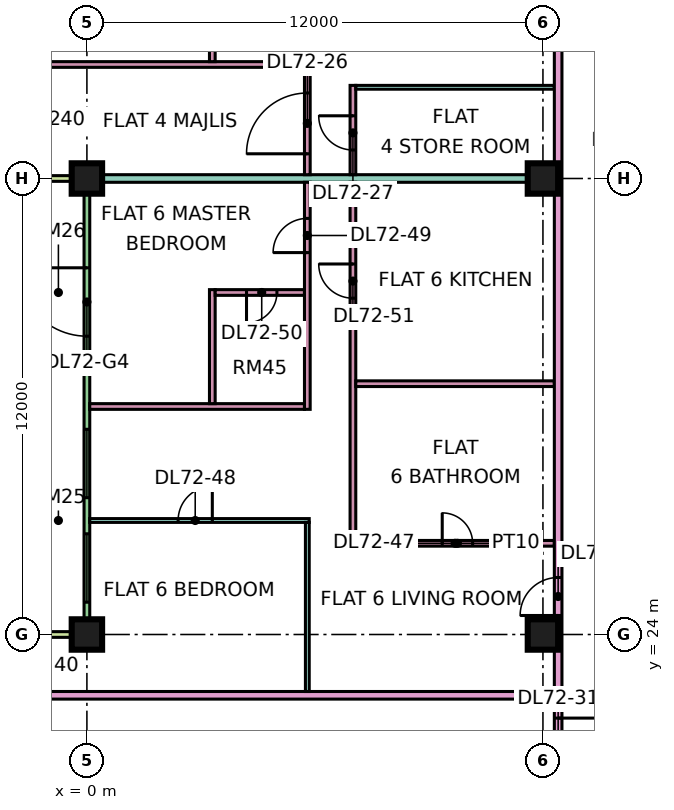
"""IFC4 building model, lengths in metres.
Left out: names, types, materials, properties, quantities, classifications, styles, units other than length and angle.
Written with IfcOpenShell. Run it as: python <this file> out.ifc"""

import sys

from ifc_helpers import new_model, si_unit, direction, frame, frame_2d, origin, origin_2d, place, context, subcontext, project, spatial, rectangle, extrude, element, fill, save


model = new_model("IFC4")
c1 = context("Model", 3, precision=1e-05, world=origin(), true_north=direction((0.0, 1.0)))
c2 = subcontext(c1, "Body", "Model", "MODEL_VIEW")
j1 = project(units=[si_unit("LENGTHUNIT", "METRE"), si_unit("PLANEANGLEUNIT", "RADIAN")], contexts=[c1])
p1 = place(None, origin())
s1 = spatial("IfcSite", under=j1, at=p1, CompositionType="ELEMENT")
p2 = place(p1, origin())
s2 = spatial("IfcBuilding", under=s1, at=p2, CompositionType="ELEMENT")
p3 = place(p2, frame((0.0, 0.0, 307.15)))
s3 = spatial("IfcBuildingStorey", under=s2, at=p3, CompositionType="ELEMENT", Elevation=307.15)
p4 = place(p3, frame((0.0, 24.0, 0.0), z_axis=(0.0, 0.0, 1.0), x_axis=(1.0, 0.0, 0.0)))
e1 = element("IfcColumn", 1, at=p4, inside=s3, PredefinedType="COLUMN", context=c2, shape_type="SweptSolid", body=[
    extrude(rectangle(XDim=0.8, YDim=0.8, at=origin_2d()), origin(), (0.0, 0.0, 1.0), 3.75),
])
p5 = place(p3, frame((0.0, 36.0, 0.0), z_axis=(0.0, 0.0, 1.0), x_axis=(1.0, 0.0, 0.0)))
e2 = element("IfcColumn", 2, at=p5, inside=s3, PredefinedType="COLUMN", context=c2, shape_type="SweptSolid", body=[
    extrude(rectangle(XDim=0.8, YDim=0.8, at=origin_2d()), origin(), (0.0, 0.0, 1.0), 3.75),
])
for number, where, z_axis, x_axis in (
    (3, (12.0, 24.0, 0.0), (0.0, 0.0, 1.0), (1.0, 0.0, 0.0)),
    (4, (12.0, 36.0, 0.0), (0.0, 0.0, 1.0), (1.0, 0.0, 0.0)),
):
    element("IfcColumn", number, at=place(p3, frame(where, z_axis=z_axis, x_axis=x_axis)), inside=s3, PredefinedType="COLUMN", context=c2, shape_type="SweptSolid", body=[
        extrude(rectangle(XDim=0.8, YDim=0.8, at=origin_2d()), origin(), (0.0, 0.0, 1.0), 3.75),
    ])
p6 = place(p3, frame((0.0, 35.925, 0.0), z_axis=(0.0, 0.0, 1.0), x_axis=(0.0, -1.0, 0.0)))
e5 = element("IfcWall", 5, at=p6, inside=s3, PredefinedType="SOLIDWALL", context=c2, shape_type="SweptSolid", body=[
    extrude(rectangle(XDim=11.85, YDim=0.15, at=frame_2d((5.925, 0.0))), origin(), (0.0, 0.0, 1.0), 3.35),
])
p7 = place(p6, frame((2.275, 0.0, 0.0)))
e6 = element("IfcOpeningElement", 6, at=p7, cuts=e5, PredefinedType="OPENING", context=c2, shape_type="SweptSolid", body=[
    extrude(rectangle(XDim=1.8, YDim=2.4, at=frame_2d((0.9, 1.2))), frame((0.0, 0.085, 0.0), z_axis=(0.0, -1.0, 0.0), x_axis=(1.0, 0.0, 0.0)), (0.0, 0.0, 1.0), 0.17),
])
p8 = place(p6, frame((6.525, 0.0, 0.45)))
e7 = element("IfcOpeningElement", 7, at=p8, cuts=e5, PredefinedType="OPENING", context=c2, shape_type="SweptSolid", body=[
    extrude(rectangle(XDim=1.8, YDim=2.4, at=frame_2d((0.9, 1.2))), frame((0.0, 0.085, 0.0), z_axis=(0.0, -1.0, 0.0), x_axis=(1.0, 0.0, 0.0)), (0.0, 0.0, 1.0), 0.17),
])
p9 = place(p6, frame((9.275, 0.0, 0.45)))
e8 = element("IfcOpeningElement", 8, at=p9, cuts=e5, PredefinedType="OPENING", context=c2, shape_type="SweptSolid", body=[
    extrude(rectangle(XDim=1.8, YDim=2.4, at=frame_2d((0.9, 1.2))), frame((0.0, 0.085, 0.0), z_axis=(0.0, -1.0, 0.0), x_axis=(1.0, 0.0, 0.0)), (0.0, 0.0, 1.0), 0.17),
])
for number, where, z_axis, x_axis in (
    (9, (-1.5, 36.0, 0.0), (0.0, 0.0, 1.0), (1.0, 0.0, 0.0)),
    (10, (-1.5, 24.0, 0.0), (0.0, 0.0, 1.0), (1.0, 0.0, 0.0)),
):
    element("IfcWall", number, at=place(p3, frame(where, z_axis=z_axis, x_axis=x_axis)), inside=s3, PredefinedType="SOLIDWALL", context=c2, shape_type="SweptSolid", body=[
        extrude(rectangle(XDim=1.5, YDim=0.15, at=frame_2d((0.75, 0.0))), origin(), (0.0, 0.0, 1.0), 3.35),
    ])
p10 = place(p3, frame((-1.351, 39.0, 0.0), z_axis=(0.0, 0.0, 1.0), x_axis=(1.0, 0.0, 0.0)))
e11 = element("IfcWall", 11, at=p10, inside=s3, PredefinedType="PARTITIONING", context=c2, shape_type="SweptSolid", body=[
    extrude(rectangle(XDim=7.076, YDim=0.15, at=frame_2d((3.538, 0.0))), origin(), (0.0, 0.0, 1.0), 3.35),
])
p11 = place(p3, frame((-1.35, 22.4, 0.0), z_axis=(0.0, 0.0, 1.0), x_axis=(1.0, 0.0, 0.0)))
e12 = element("IfcWall", 12, at=p11, inside=s3, PredefinedType="PARTITIONING", context=c2, shape_type="SweptSolid", body=[
    extrude(rectangle(XDim=13.65, YDim=0.2, at=frame_2d((6.825, 0.0))), origin(), (0.0, 0.0, 1.0), 3.35),
])
e13 = element("IfcWall", 13, at=p5, inside=s3, PredefinedType="PARTITIONING", context=c2, shape_type="SweptSolid", body=[
    extrude(rectangle(XDim=12.3, YDim=0.2, at=frame_2d((6.15, 0.0))), origin(), (0.0, 0.0, 1.0), 3.35),
])
p12 = place(p3, frame((0.074, 27.0, 0.0), z_axis=(0.0, 0.0, 1.0), x_axis=(1.0, 0.0, 0.0)))
e14 = element("IfcWall", 14, at=p12, inside=s3, PredefinedType="PARTITIONING", context=c2, shape_type="SweptSolid", body=[
    extrude(rectangle(XDim=5.776, YDim=0.1, at=frame_2d((2.888, 0.0))), origin(), (0.0, 0.0, 1.0), 3.35),
])
p13 = place(p12, frame((2.326, 0.0, 0.0)))
e15 = element("IfcOpeningElement", 15, at=p13, cuts=e14, PredefinedType="OPENING", context=c2, shape_type="SweptSolid", body=[
    extrude(rectangle(XDim=0.9, YDim=2.1, at=frame_2d((0.45, 1.05))), frame((0.0, 0.06, 0.0), z_axis=(0.0, -1.0, 0.0), x_axis=(1.0, 0.0, 0.0)), (0.0, 0.0, 1.0), 0.12),
])
p14 = place(p3, frame((0.074, 30.0, 0.0), z_axis=(0.0, 0.0, 1.0), x_axis=(1.0, 0.0, 0.0)))
e16 = element("IfcWall", 16, at=p14, inside=s3, PredefinedType="PARTITIONING", context=c2, shape_type="SweptSolid", body=[
    extrude(rectangle(XDim=5.651, YDim=0.15, at=frame_2d((2.826, 0.0))), origin(), (0.0, 0.0, 1.0), 3.35),
])
for number, where, z_axis, x_axis in (
    (17, (3.3, 30.075, 0.0), (0.0, 0.0, 1.0), (0.0, 1.0, 0.0)),
    (18, (3.3, 39.075, 0.0), (0.0, 0.0, 1.0), (0.0, 1.0, 0.0)),
):
    element("IfcWall", number, at=place(p3, frame(where, z_axis=z_axis, x_axis=x_axis)), inside=s3, PredefinedType="PARTITIONING", context=c2, shape_type="SweptSolid", body=[
        extrude(rectangle(XDim=3.0, YDim=0.15, at=frame_2d((1.5, 0.0))), origin(), (0.0, 0.0, 1.0), 3.35),
    ])
p15 = place(p3, frame((3.375, 33.0, 0.0), z_axis=(0.0, 0.0, 1.0), x_axis=(1.0, 0.0, 0.0)))
e19 = element("IfcWall", 19, at=p15, inside=s3, PredefinedType="PARTITIONING", context=c2, shape_type="SweptSolid", body=[
    extrude(rectangle(XDim=2.35, YDim=0.15, at=frame_2d((1.175, 0.0))), origin(), (0.0, 0.0, 1.0), 3.35),
])
p16 = place(p15, frame((0.825, 0.0, 0.0)))
e20 = element("IfcOpeningElement", 20, at=p16, cuts=e19, PredefinedType="OPENING", context=c2, shape_type="SweptSolid", body=[
    extrude(rectangle(XDim=0.8, YDim=2.1, at=frame_2d((0.4, 1.05))), frame((0.0, 0.085, 0.0), z_axis=(0.0, -1.0, 0.0), x_axis=(1.0, 0.0, 0.0)), (0.0, 0.0, 1.0), 0.17),
])
p17 = place(p3, frame((5.8, 22.5, 0.0), z_axis=(0.0, 0.0, 1.0), x_axis=(0.0, 1.0, 0.0)))
e21 = element("IfcWall", 21, at=p17, inside=s3, PredefinedType="PARTITIONING", context=c2, shape_type="SweptSolid", body=[
    extrude(rectangle(XDim=4.45, YDim=0.1, at=frame_2d((2.225, 0.0))), origin(), (0.0, 0.0, 1.0), 3.35),
])
p18 = place(p3, frame((5.8, 29.925, 0.0), z_axis=(0.0, 0.0, 1.0), x_axis=(0.0, 1.0, 0.0)))
e22 = element("IfcWall", 22, at=p18, inside=s3, PredefinedType="PARTITIONING", context=c2, shape_type="SweptSolid", body=[
    extrude(rectangle(XDim=5.975, YDim=0.15, at=frame_2d((2.987, 0.0))), origin(), (0.0, 0.0, 1.0), 3.35),
])
p19 = place(p18, frame((4.125, 0.0, 0.0)))
e23 = element("IfcOpeningElement", 23, at=p19, cuts=e22, PredefinedType="OPENING", context=c2, shape_type="SweptSolid", body=[
    extrude(rectangle(XDim=0.9, YDim=2.1, at=frame_2d((0.45, 1.05))), frame((0.0, 0.085, 0.0), z_axis=(0.0, -1.0, 0.0), x_axis=(1.0, 0.0, 0.0)), (0.0, 0.0, 1.0), 0.17),
])
p20 = place(p3, frame((5.8, 36.1, 0.0), z_axis=(0.0, 0.0, 1.0), x_axis=(0.0, 1.0, 0.0)))
e24 = element("IfcWall", 24, at=p20, inside=s3, PredefinedType="PARTITIONING", context=c2, shape_type="SweptSolid", body=[
    extrude(rectangle(XDim=11.95, YDim=0.15, at=frame_2d((5.975, 0.0))), origin(), (0.0, 0.0, 1.0), 3.35),
])
p21 = place(p20, frame((9.95, 0.0, 0.0)))
e25 = element("IfcOpeningElement", 25, at=p21, cuts=e24, PredefinedType="OPENING", context=c2, shape_type="SweptSolid", body=[
    extrude(rectangle(XDim=0.9, YDim=2.1, at=frame_2d((0.45, 1.05))), frame((0.0, 0.085, 0.0), z_axis=(0.0, -1.0, 0.0), x_axis=(1.0, 0.0, 0.0)), (0.0, 0.0, 1.0), 0.17),
])
p22 = place(p20, frame((6.95, 0.0, 0.0)))
e26 = element("IfcOpeningElement", 26, at=p22, cuts=e24, PredefinedType="OPENING", context=c2, shape_type="SweptSolid", body=[
    extrude(rectangle(XDim=0.9, YDim=2.1, at=frame_2d((0.45, 1.05))), frame((0.0, 0.085, 0.0), z_axis=(0.0, -1.0, 0.0), x_axis=(1.0, 0.0, 0.0)), (0.0, 0.0, 1.0), 0.17),
])
p23 = place(p20, frame((0.55, 0.0, 0.0)))
e27 = element("IfcOpeningElement", 27, at=p23, cuts=e24, PredefinedType="OPENING", context=c2, shape_type="SweptSolid", body=[
    extrude(rectangle(XDim=1.6, YDim=2.1, at=frame_2d((0.8, 1.05))), frame((0.0, 0.085, 0.0), z_axis=(0.0, -1.0, 0.0), x_axis=(1.0, 0.0, 0.0)), (0.0, 0.0, 1.0), 0.17),
])
p24 = place(p3, frame((7.0, 26.325, 0.0), z_axis=(0.0, 0.0, 1.0), x_axis=(0.0, 1.0, 0.0)))
e28 = element("IfcWall", 28, at=p24, inside=s3, PredefinedType="PARTITIONING", context=c2, shape_type="SweptSolid", body=[
    extrude(rectangle(XDim=9.575, YDim=0.15, at=frame_2d((4.788, 0.0))), origin(), (0.0, 0.0, 1.0), 3.35),
])
p25 = place(p24, frame((6.525, 0.0, 0.0)))
e29 = element("IfcOpeningElement", 29, at=p25, cuts=e28, PredefinedType="OPENING", context=c2, shape_type="SweptSolid", body=[
    extrude(rectangle(XDim=0.9, YDim=2.1, at=frame_2d((0.45, 1.05))), frame((0.0, 0.085, 0.0), z_axis=(0.0, -1.0, 0.0), x_axis=(1.0, 0.0, 0.0)), (0.0, 0.0, 1.0), 0.17),
])
p26 = place(p3, frame((7.0, 36.1, 0.0), z_axis=(0.0, 0.0, 1.0), x_axis=(0.0, 1.0, 0.0)))
e30 = element("IfcWall", 30, at=p26, inside=s3, PredefinedType="PARTITIONING", context=c2, shape_type="SweptSolid", body=[
    extrude(rectangle(XDim=2.35, YDim=0.15, at=frame_2d((1.175, 0.0))), origin(), (0.0, 0.0, 1.0), 3.35),
])
p27 = place(p26, frame((0.65, 0.0, 0.0)))
e31 = element("IfcOpeningElement", 31, at=p27, cuts=e30, PredefinedType="OPENING", context=c2, shape_type="SweptSolid", body=[
    extrude(rectangle(XDim=0.9, YDim=2.1, at=frame_2d((0.45, 1.05))), frame((0.0, 0.085, 0.0), z_axis=(0.0, -1.0, 0.0), x_axis=(1.0, 0.0, 0.0)), (0.0, 0.0, 1.0), 0.17),
])
p28 = place(p3, frame((7.075, 26.4, 0.0), z_axis=(0.0, 0.0, 1.0), x_axis=(1.0, 0.0, 0.0)))
e32 = element("IfcWall", 32, at=p28, inside=s3, PredefinedType="PARTITIONING", context=c2, shape_type="SweptSolid", body=[
    extrude(rectangle(XDim=5.225, YDim=0.15, at=frame_2d((2.613, 0.0))), origin(), (0.0, 0.0, 1.0), 3.35),
])
p29 = place(p28, frame((2.275, 0.0, 0.0)))
e33 = element("IfcOpeningElement", 33, at=p29, cuts=e32, PredefinedType="OPENING", context=c2, shape_type="SweptSolid", body=[
    extrude(rectangle(XDim=0.8, YDim=2.1, at=frame_2d((0.4, 1.05))), frame((0.0, 0.085, 0.0), z_axis=(0.0, -1.0, 0.0), x_axis=(1.0, 0.0, 0.0)), (0.0, 0.0, 1.0), 0.17),
])
p30 = place(p3, frame((7.075, 30.6, 0.0), z_axis=(0.0, 0.0, 1.0), x_axis=(1.0, 0.0, 0.0)))
e34 = element("IfcWall", 34, at=p30, inside=s3, PredefinedType="PARTITIONING", context=c2, shape_type="SweptSolid", body=[
    extrude(rectangle(XDim=5.225, YDim=0.15, at=frame_2d((2.613, 0.0))), origin(), (0.0, 0.0, 1.0), 3.35),
])
p31 = place(p3, frame((7.075, 38.4, 0.0), z_axis=(0.0, 0.0, 1.0), x_axis=(1.0, 0.0, 0.0)))
e35 = element("IfcWall", 35, at=p31, inside=s3, PredefinedType="PARTITIONING", context=c2, shape_type="SweptSolid", body=[
    extrude(rectangle(XDim=5.225, YDim=0.1, at=frame_2d((2.613, 0.0))), origin(), (0.0, 0.0, 1.0), 3.35),
])
p32 = place(p3, frame((12.4, 20.0, 0.0), z_axis=(0.0, 0.0, 1.0), x_axis=(0.0, 1.0, 0.0)))
e36 = element("IfcWall", 36, at=p32, inside=s3, PredefinedType="PARTITIONING", context=c2, shape_type="SweptSolid", body=[
    extrude(rectangle(XDim=34.0, YDim=0.2, at=frame_2d((17.0, 0.0))), origin(), (0.0, 0.0, 1.0), 3.35),
])
p33 = place(p32, frame((19.8, 0.0, 0.0)))
e37 = element("IfcOpeningElement", 37, at=p33, cuts=e36, PredefinedType="OPENING", context=c2, shape_type="SweptSolid", body=[
    extrude(rectangle(XDim=1.0, YDim=2.1, at=frame_2d((0.5, 1.05))), frame((0.0, 0.11, 0.0), z_axis=(0.0, -1.0, 0.0), x_axis=(1.0, 0.0, 0.0)), (0.0, 0.0, 1.0), 0.22),
])
p34 = place(p32, frame((0.6, 0.0, 0.0)))
e38 = element("IfcOpeningElement", 38, at=p34, cuts=e36, PredefinedType="OPENING", context=c2, shape_type="SweptSolid", body=[
    extrude(rectangle(XDim=1.2, YDim=2.1, at=frame_2d((0.6, 1.05))), frame((0.0, 0.11, 0.0), z_axis=(0.0, -1.0, 0.0), x_axis=(1.0, 0.0, 0.0)), (0.0, 0.0, 1.0), 0.22),
])
p35 = place(p32, frame((4.5, 0.0, 0.0)))
e39 = element("IfcOpeningElement", 39, at=p35, cuts=e36, PredefinedType="OPENING", context=c2, shape_type="SweptSolid", body=[
    extrude(rectangle(XDim=1.0, YDim=2.1, at=frame_2d((0.5, 1.05))), frame((0.0, 0.11, 0.0), z_axis=(0.0, -1.0, 0.0), x_axis=(1.0, 0.0, 0.0)), (0.0, 0.0, 1.0), 0.22),
])
p36 = place(p7, frame((1.8, 0.0, 0.0), z_axis=(0.0, 0.0, 1.0), x_axis=(-1.0, 0.0, 0.0)))
e40 = element("IfcDoor", 40, at=p36, inside=s3, OperationType="DOUBLE_DOOR_SINGLE_SWING", PredefinedType="DOOR", context=c2, shape_type="SweptSolid", body=[
    extrude(rectangle(XDim=1.8, YDim=2.4, at=frame_2d((0.9, 1.2))), frame((0.0, 0.025, 0.0), z_axis=(0.0, -1.0, 0.0), x_axis=(1.0, 0.0, 0.0)), (0.0, 0.0, 1.0), 0.05),
])
fill(e6, e40)
p37 = place(p8, origin())
e41 = element("IfcWindow", 41, at=p37, inside=s3, PartitioningType="SINGLE_PANEL", PredefinedType="WINDOW", context=c2, shape_type="SweptSolid", body=[
    extrude(rectangle(XDim=1.8, YDim=2.4, at=frame_2d((0.9, 1.2))), frame((0.0, 0.03, 0.0), z_axis=(0.0, -1.0, 0.0), x_axis=(1.0, 0.0, 0.0)), (0.0, 0.0, 1.0), 0.06),
])
fill(e7, e41)
p38 = place(p9, origin())
e42 = element("IfcWindow", 42, at=p38, inside=s3, PartitioningType="SINGLE_PANEL", PredefinedType="WINDOW", context=c2, shape_type="SweptSolid", body=[
    extrude(rectangle(XDim=1.8, YDim=2.4, at=frame_2d((0.9, 1.2))), frame((0.0, 0.03, 0.0), z_axis=(0.0, -1.0, 0.0), x_axis=(1.0, 0.0, 0.0)), (0.0, 0.0, 1.0), 0.06),
])
fill(e8, e42)
p39 = place(p23, origin())
e43 = element("IfcDoor", 43, at=p39, inside=s3, OperationType="DOUBLE_DOOR_SINGLE_SWING", PredefinedType="DOOR", context=c2, shape_type="SweptSolid", body=[
    extrude(rectangle(XDim=1.6, YDim=2.1, at=frame_2d((0.8, 1.05))), frame((0.0, 0.025, 0.0), z_axis=(0.0, -1.0, 0.0), x_axis=(1.0, 0.0, 0.0)), (0.0, 0.0, 1.0), 0.05),
])
fill(e27, e43)
p40 = place(p27, frame((0.9, 0.0, 0.0), z_axis=(0.0, 0.0, 1.0), x_axis=(-1.0, 0.0, 0.0)))
e44 = element("IfcDoor", 44, at=p40, inside=s3, OperationType="SINGLE_SWING_RIGHT", PredefinedType="DOOR", context=c2, shape_type="SweptSolid", body=[
    extrude(rectangle(XDim=0.9, YDim=2.1, at=frame_2d((0.45, 1.05))), frame((0.0, 0.025, 0.0), z_axis=(0.0, -1.0, 0.0), x_axis=(1.0, 0.0, 0.0)), (0.0, 0.0, 1.0), 0.05),
])
fill(e31, e44)
p41 = place(p34, origin())
e45 = element("IfcDoor", 45, at=p41, inside=s3, OperationType="SINGLE_SWING_RIGHT", PredefinedType="DOOR", context=c2, shape_type="SweptSolid", body=[
    extrude(rectangle(XDim=1.2, YDim=2.1, at=frame_2d((0.6, 1.05))), frame((0.0, 0.025, 0.0), z_axis=(0.0, -1.0, 0.0), x_axis=(1.0, 0.0, 0.0)), (0.0, 0.0, 1.0), 0.05),
])
fill(e38, e45)
p42 = place(p29, origin())
e46 = element("IfcDoor", 46, at=p42, inside=s3, OperationType="SINGLE_SWING_LEFT", PredefinedType="DOOR", context=c2, shape_type="SweptSolid", body=[
    extrude(rectangle(XDim=0.8, YDim=2.1, at=frame_2d((0.4, 1.05))), frame((0.0, 0.025, 0.0), z_axis=(0.0, -1.0, 0.0), x_axis=(1.0, 0.0, 0.0)), (0.0, 0.0, 1.0), 0.05),
])
fill(e33, e46)
p43 = place(p13, frame((0.9, 0.0, 0.0), z_axis=(0.0, 0.0, 1.0), x_axis=(-1.0, 0.0, 0.0)))
e47 = element("IfcDoor", 47, at=p43, inside=s3, OperationType="SINGLE_SWING_RIGHT", PredefinedType="DOOR", context=c2, shape_type="SweptSolid", body=[
    extrude(rectangle(XDim=0.9, YDim=2.1, at=frame_2d((0.45, 1.05))), frame((0.0, 0.025, 0.0), z_axis=(0.0, -1.0, 0.0), x_axis=(1.0, 0.0, 0.0)), (0.0, 0.0, 1.0), 0.05),
])
fill(e15, e47)
p44 = place(p19, origin())
e48 = element("IfcDoor", 48, at=p44, inside=s3, OperationType="SINGLE_SWING_LEFT", PredefinedType="DOOR", context=c2, shape_type="SweptSolid", body=[
    extrude(rectangle(XDim=0.9, YDim=2.1, at=frame_2d((0.45, 1.05))), frame((0.0, 0.025, 0.0), z_axis=(0.0, -1.0, 0.0), x_axis=(1.0, 0.0, 0.0)), (0.0, 0.0, 1.0), 0.05),
])
fill(e23, e48)
p45 = place(p16, frame((0.8, 0.0, 0.0), z_axis=(0.0, 0.0, 1.0), x_axis=(-1.0, 0.0, 0.0)))
e49 = element("IfcDoor", 49, at=p45, inside=s3, OperationType="SINGLE_SWING_LEFT", PredefinedType="DOOR", context=c2, shape_type="SweptSolid", body=[
    extrude(rectangle(XDim=0.8, YDim=2.1, at=frame_2d((0.4, 1.05))), frame((0.0, 0.025, 0.0), z_axis=(0.0, -1.0, 0.0), x_axis=(1.0, 0.0, 0.0)), (0.0, 0.0, 1.0), 0.05),
])
fill(e20, e49)
p46 = place(p25, frame((0.9, 0.0, 0.0), z_axis=(0.0, 0.0, 1.0), x_axis=(-1.0, 0.0, 0.0)))
e50 = element("IfcDoor", 50, at=p46, inside=s3, OperationType="SINGLE_SWING_RIGHT", PredefinedType="DOOR", context=c2, shape_type="SweptSolid", body=[
    extrude(rectangle(XDim=0.9, YDim=2.1, at=frame_2d((0.45, 1.05))), frame((0.0, 0.025, 0.0), z_axis=(0.0, -1.0, 0.0), x_axis=(1.0, 0.0, 0.0)), (0.0, 0.0, 1.0), 0.05),
])
fill(e29, e50)
p47 = place(p35, origin())
e51 = element("IfcDoor", 51, at=p47, inside=s3, OperationType="SINGLE_SWING_LEFT", PredefinedType="DOOR", context=c2, shape_type="SweptSolid", body=[
    extrude(rectangle(XDim=1.0, YDim=2.1, at=frame_2d((0.5, 1.05))), frame((0.0, 0.025, 0.0), z_axis=(0.0, -1.0, 0.0), x_axis=(1.0, 0.0, 0.0)), (0.0, 0.0, 1.0), 0.05),
])
fill(e39, e51)
save(model, sys.argv[1])
